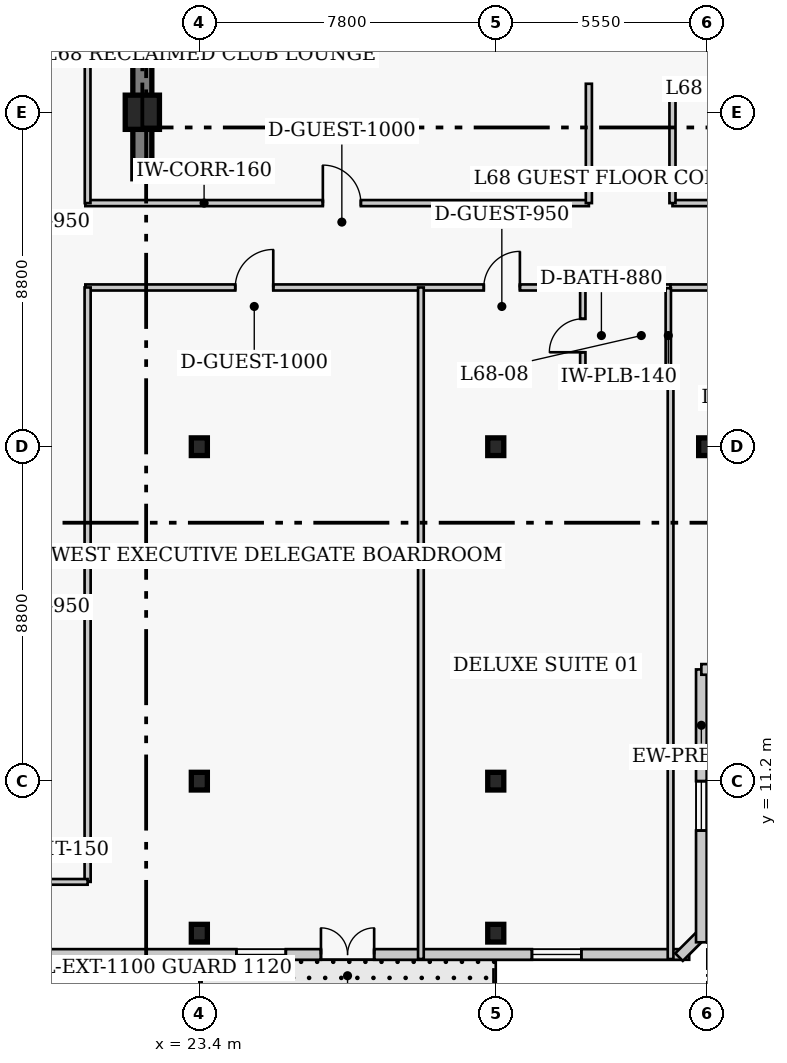
"""IFC4 building model, lengths in metres.
Left out: names, types, materials, properties, quantities, classifications, styles, units other than length and angle.
Written with IfcOpenShell. Run it as: python <this file> out.ifc"""

import sys

from ifc_helpers import new_model, si_unit, direction, frame, frame_2d, origin, origin_2d, place, context, subcontext, project, spatial, rectangle, i_section, extrude, element, fill, save


model = new_model("IFC4")
c1 = context("Model", 3, precision=1e-05, world=origin(), true_north=direction((0.0, 1.0)))
c2 = subcontext(c1, "Body", "Model", "MODEL_VIEW")
j1 = project(units=[si_unit("LENGTHUNIT", "METRE"), si_unit("PLANEANGLEUNIT", "RADIAN")], contexts=[c1])
p1 = place(None, origin())
s1 = spatial("IfcSite", under=j1, at=p1, CompositionType="ELEMENT")
p2 = place(p1, origin())
s2 = spatial("IfcBuilding", under=s1, at=p2, CompositionType="ELEMENT")
p3 = place(p2, frame((0.0, 0.0, 273.4)))
s3 = spatial("IfcBuildingStorey", under=s2, at=p3, CompositionType="ELEMENT", Elevation=273.4)
p4 = place(p3, frame((21.9, 27.05, 0.0), z_axis=(0.0, 0.0, 1.0), x_axis=(0.0, 1.0, 0.0)))
e1 = element("IfcWall", 1, at=p4, inside=s3, PredefinedType="SHEAR", context=c2, shape_type="SweptSolid", body=[
    extrude(rectangle(XDim=13.52, YDim=0.5, at=frame_2d((6.76, 0.0))), origin(), (0.0, 0.0, 1.0), 4.0),
])
for number, where, z_axis, x_axis in (
    (2, (23.4, 11.2, 0.0), (0.0, 0.0, 1.0), (1.0, 0.0, 0.0)),
    (3, (23.4, 20.0, 0.0), (0.0, 0.0, 1.0), (1.0, 0.0, 0.0)),
    (4, (31.2, 11.2, 0.0), (0.0, 0.0, 1.0), (1.0, 0.0, 0.0)),
    (5, (31.2, 20.0, 0.0), (0.0, 0.0, 1.0), (1.0, 0.0, 0.0)),
    (6, (36.75, 20.0, 0.0), (0.0, 0.0, 1.0), (1.0, 0.0, 0.0)),
):
    element("IfcColumn", number, at=place(p3, frame(where, z_axis=z_axis, x_axis=x_axis)), inside=s3, PredefinedType="COLUMN", context=c2, shape_type="SweptSolid", body=[
        extrude(i_section(OverallWidth=0.422, OverallDepth=0.465, WebThickness=0.045, FlangeThickness=0.073, FilletRadius=0.017, at=origin_2d()), origin(), (0.0, 0.0, 1.0), 4.0),
    ])
p5 = place(p3, frame((21.9, 28.8, 0.0), z_axis=(0.0, 0.0, 1.0), x_axis=(1.0, 0.0, 0.0)))
e7 = element("IfcColumn", 7, at=p5, inside=s3, PredefinedType="COLUMN", context=c2, shape_type="SweptSolid", body=[
    extrude(rectangle(XDim=0.9, YDim=0.9, at=origin_2d()), origin(), (0.0, 0.0, 1.0), 4.0),
])
for number, where, z_axis, x_axis in (
    (8, (23.4, 7.2, 0.0), (0.0, 0.0, 1.0), (1.0, 0.0, 0.0)),
    (9, (31.2, 7.2, 0.0), (0.0, 0.0, 1.0), (1.0, 0.0, 0.0)),
):
    element("IfcColumn", number, at=place(p3, frame(where, z_axis=z_axis, x_axis=x_axis)), inside=s3, PredefinedType="COLUMN", context=c2, shape_type="SweptSolid", body=[
        extrude(i_section(OverallWidth=0.422, OverallDepth=0.465, WebThickness=0.045, FlangeThickness=0.073, FilletRadius=0.017, at=origin_2d()), origin(), (0.0, 0.0, 1.0), 4.0),
    ])
p6 = place(p3, frame((11.46, 6.64, 0.0), z_axis=(0.0, 0.0, 1.0), x_axis=(1.0, 0.0, 0.0)))
e10 = element("IfcWall", 10, at=p6, inside=s3, PredefinedType="SOLIDWALL", context=c2, shape_type="SweptSolid", body=[
    extrude(rectangle(XDim=24.83, YDim=0.28, at=frame_2d((12.415, 0.0))), origin(), (0.0, 0.0, 1.0), 3.76),
])
p7 = place(p6, frame((15.14, 0.0, 0.0)))
e11 = element("IfcOpeningElement", 11, at=p7, cuts=e10, PredefinedType="OPENING", context=c2, shape_type="SweptSolid", body=[
    extrude(rectangle(XDim=1.4, YDim=2.15, at=frame_2d((0.7, 1.075))), frame((0.0, 0.15, 0.0), z_axis=(0.0, -1.0, 0.0), x_axis=(1.0, 0.0, 0.0)), (0.0, 0.0, 1.0), 0.3),
])
p8 = place(p6, frame((3.488, 0.0, 0.85)))
e12 = element("IfcOpeningElement", 12, at=p8, cuts=e10, PredefinedType="OPENING", context=c2, shape_type="SweptSolid", body=[
    extrude(rectangle(XDim=1.3, YDim=1.7, at=frame_2d((0.65, 0.85))), frame((0.0, 0.15, 0.0), z_axis=(0.0, -1.0, 0.0), x_axis=(1.0, 0.0, 0.0)), (0.0, 0.0, 1.0), 0.3),
])
p9 = place(p6, frame((12.915, 0.0, 0.85)))
e13 = element("IfcOpeningElement", 13, at=p9, cuts=e10, PredefinedType="OPENING", context=c2, shape_type="SweptSolid", body=[
    extrude(rectangle(XDim=1.3, YDim=1.7, at=frame_2d((0.65, 0.85))), frame((0.0, 0.15, 0.0), z_axis=(0.0, -1.0, 0.0), x_axis=(1.0, 0.0, 0.0)), (0.0, 0.0, 1.0), 0.3),
])
p10 = place(p6, frame((20.692, 0.0, 0.85)))
e14 = element("IfcOpeningElement", 14, at=p10, cuts=e10, PredefinedType="OPENING", context=c2, shape_type="SweptSolid", body=[
    extrude(rectangle(XDim=1.3, YDim=1.7, at=frame_2d((0.65, 0.85))), frame((0.0, 0.15, 0.0), z_axis=(0.0, -1.0, 0.0), x_axis=(1.0, 0.0, 0.0)), (0.0, 0.0, 1.0), 0.3),
])
p11 = place(p3, frame((36.023, 6.571, 0.0), z_axis=(0.0, 0.0, 1.0), x_axis=(0.707106781187, 0.707106781187, 0.0)))
e15 = element("IfcWall", 15, at=p11, inside=s3, PredefinedType="SOLIDWALL", context=c2, shape_type="SweptSolid", body=[
    extrude(rectangle(XDim=0.928, YDim=0.28, at=frame_2d((0.464, 0.0))), origin(), (0.0, 0.0, 1.0), 3.76),
])
p12 = place(p3, frame((36.61, 6.96, 0.0), z_axis=(0.0, 0.0, 1.0), x_axis=(0.0, 1.0, 0.0)))
e16 = element("IfcWall", 16, at=p12, inside=s3, PredefinedType="SOLIDWALL", context=c2, shape_type="SweptSolid", body=[
    extrude(rectangle(XDim=7.18, YDim=0.28, at=frame_2d((3.59, 0.0))), origin(), (0.0, 0.0, 1.0), 3.76),
])
p13 = place(p12, frame((2.94, 0.0, 0.85)))
e17 = element("IfcOpeningElement", 17, at=p13, cuts=e16, PredefinedType="OPENING", context=c2, shape_type="SweptSolid", body=[
    extrude(rectangle(XDim=1.3, YDim=1.7, at=frame_2d((0.65, 0.85))), frame((0.0, 0.15, 0.0), z_axis=(0.0, -1.0, 0.0), x_axis=(1.0, 0.0, 0.0)), (0.0, 0.0, 1.0), 0.3),
])
p14 = place(p3, frame((36.61, 14.14, 0.0), z_axis=(0.0, 0.0, 1.0), x_axis=(1.0, 0.0, 0.0)))
e18 = element("IfcWall", 18, at=p14, inside=s3, PredefinedType="SOLIDWALL", context=c2, shape_type="SweptSolid", body=[
    extrude(rectangle(XDim=4.78, YDim=0.28, at=frame_2d((2.39, 0.0))), origin(), (0.0, 0.0, 1.0), 3.76),
])
p15 = place(p14, frame((1.74, 0.0, 0.85)))
e19 = element("IfcOpeningElement", 19, at=p15, cuts=e18, PredefinedType="OPENING", context=c2, shape_type="SweptSolid", body=[
    extrude(rectangle(XDim=1.3, YDim=1.7, at=frame_2d((0.65, 0.85))), frame((0.0, 0.15, 0.0), z_axis=(0.0, -1.0, 0.0), x_axis=(1.0, 0.0, 0.0)), (0.0, 0.0, 1.0), 0.3),
])
p16 = place(p3, frame((20.4, 26.41, 0.0), z_axis=(0.0, 0.0, 1.0), x_axis=(1.0, 0.0, 0.0)))
e20 = element("IfcWall", 20, at=p16, inside=s3, PredefinedType="PARTITIONING", context=c2, shape_type="SweptSolid", body=[
    extrude(rectangle(XDim=13.25, YDim=0.16, at=frame_2d((6.625, 0.0))), origin(), (0.0, 0.0, 1.0), 3.76),
])
p17 = place(p16, frame((6.25, 0.0, 0.0)))
e21 = element("IfcOpeningElement", 21, at=p17, cuts=e20, PredefinedType="OPENING", context=c2, shape_type="SweptSolid", body=[
    extrude(rectangle(XDim=1.0, YDim=2.15, at=frame_2d((0.5, 1.075))), frame((0.0, 0.09, 0.0), z_axis=(0.0, -1.0, 0.0), x_axis=(1.0, 0.0, 0.0)), (0.0, 0.0, 1.0), 0.18),
])
p18 = place(p3, frame((35.85, 26.41, 0.0), z_axis=(0.0, 0.0, 1.0), x_axis=(1.0, 0.0, 0.0)))
e22 = element("IfcWall", 22, at=p18, inside=s3, PredefinedType="PARTITIONING", context=c2, shape_type="SweptSolid", body=[
    extrude(rectangle(XDim=22.6, YDim=0.16, at=frame_2d((11.3, 0.0))), origin(), (0.0, 0.0, 1.0), 3.76),
])
p19 = place(p18, frame((4.55, 0.0, 0.0)))
e23 = element("IfcOpeningElement", 23, at=p19, cuts=e22, PredefinedType="OPENING", context=c2, shape_type="SweptSolid", body=[
    extrude(rectangle(XDim=1.0, YDim=2.15, at=frame_2d((0.5, 1.075))), frame((0.0, 0.09, 0.0), z_axis=(0.0, -1.0, 0.0), x_axis=(1.0, 0.0, 0.0)), (0.0, 0.0, 1.0), 0.18),
])
p20 = place(p18, frame((12.05, 0.0, 0.0)))
e24 = element("IfcOpeningElement", 24, at=p20, cuts=e22, PredefinedType="OPENING", context=c2, shape_type="SweptSolid", body=[
    extrude(rectangle(XDim=1.0, YDim=2.15, at=frame_2d((0.5, 1.075))), frame((0.0, 0.09, 0.0), z_axis=(0.0, -1.0, 0.0), x_axis=(1.0, 0.0, 0.0)), (0.0, 0.0, 1.0), 0.18),
])
for number, where, z_axis, x_axis in (
    (25, (33.65, 26.41, 0.0), (0.0, 0.0, 1.0), (0.0, 1.0, 0.0)),
    (26, (35.85, 26.41, 0.0), (0.0, 0.0, 1.0), (0.0, 1.0, 0.0)),
):
    element("IfcWall", number, at=place(p3, frame(where, z_axis=z_axis, x_axis=x_axis)), inside=s3, PredefinedType="PARTITIONING", context=c2, shape_type="SweptSolid", body=[
        extrude(rectangle(XDim=3.14, YDim=0.16, at=frame_2d((1.57, 0.0))), origin(), (0.0, 0.0, 1.0), 3.76),
    ])
p21 = place(p3, frame((20.4, 24.19, 0.0), z_axis=(0.0, 0.0, 1.0), x_axis=(1.0, 0.0, 0.0)))
e27 = element("IfcWall", 27, at=p21, inside=s3, PredefinedType="PARTITIONING", context=c2, shape_type="SweptSolid", body=[
    extrude(rectangle(XDim=15.4, YDim=0.16, at=frame_2d((7.7, 0.0))), origin(), (0.0, 0.0, 1.0), 3.76),
])
p22 = place(p21, frame((3.945, 0.0, 0.0)))
e28 = element("IfcOpeningElement", 28, at=p22, cuts=e27, PredefinedType="OPENING", context=c2, shape_type="SweptSolid", body=[
    extrude(rectangle(XDim=1.0, YDim=2.15, at=frame_2d((0.5, 1.075))), frame((0.0, 0.09, 0.0), z_axis=(0.0, -1.0, 0.0), x_axis=(1.0, 0.0, 0.0)), (0.0, 0.0, 1.0), 0.18),
])
p23 = place(p21, frame((10.485, 0.0, 0.0)))
e29 = element("IfcOpeningElement", 29, at=p23, cuts=e27, PredefinedType="OPENING", context=c2, shape_type="SweptSolid", body=[
    extrude(rectangle(XDim=0.95, YDim=2.1, at=frame_2d((0.475, 1.05))), frame((0.0, 0.09, 0.0), z_axis=(0.0, -1.0, 0.0), x_axis=(1.0, 0.0, 0.0)), (0.0, 0.0, 1.0), 0.18),
])
p24 = place(p3, frame((35.8, 24.19, 0.0), z_axis=(0.0, 0.0, 1.0), x_axis=(1.0, 0.0, 0.0)))
e30 = element("IfcWall", 30, at=p24, inside=s3, PredefinedType="PARTITIONING", context=c2, shape_type="SweptSolid", body=[
    extrude(rectangle(XDim=24.81, YDim=0.16, at=frame_2d((12.405, 0.0))), origin(), (0.0, 0.0, 1.0), 3.76),
])
p25 = place(p24, frame((2.115, 0.0, 0.0)))
e31 = element("IfcOpeningElement", 31, at=p25, cuts=e30, PredefinedType="OPENING", context=c2, shape_type="SweptSolid", body=[
    extrude(rectangle(XDim=0.95, YDim=2.1, at=frame_2d((0.475, 1.05))), frame((0.0, 0.09, 0.0), z_axis=(0.0, -1.0, 0.0), x_axis=(1.0, 0.0, 0.0)), (0.0, 0.0, 1.0), 0.18),
])
p26 = place(p24, frame((11.345, 0.0, 0.0)))
e32 = element("IfcOpeningElement", 32, at=p26, cuts=e30, PredefinedType="OPENING", context=c2, shape_type="SweptSolid", body=[
    extrude(rectangle(XDim=1.0, YDim=2.15, at=frame_2d((0.5, 1.075))), frame((0.0, 0.09, 0.0), z_axis=(0.0, -1.0, 0.0), x_axis=(1.0, 0.0, 0.0)), (0.0, 0.0, 1.0), 0.18),
])
p27 = place(p24, frame((17.47, 0.0, 0.0)))
e33 = element("IfcOpeningElement", 33, at=p27, cuts=e30, PredefinedType="OPENING", context=c2, shape_type="SweptSolid", body=[
    extrude(rectangle(XDim=0.95, YDim=2.1, at=frame_2d((0.475, 1.05))), frame((0.0, 0.09, 0.0), z_axis=(0.0, -1.0, 0.0), x_axis=(1.0, 0.0, 0.0)), (0.0, 0.0, 1.0), 0.18),
])
p28 = place(p24, frame((23.265, 0.0, 0.0)))
e34 = element("IfcOpeningElement", 34, at=p28, cuts=e30, PredefinedType="OPENING", context=c2, shape_type="SweptSolid", body=[
    extrude(rectangle(XDim=0.95, YDim=2.1, at=frame_2d((0.475, 1.05))), frame((0.0, 0.09, 0.0), z_axis=(0.0, -1.0, 0.0), x_axis=(1.0, 0.0, 0.0)), (0.0, 0.0, 1.0), 0.18),
])
p29 = place(p3, frame((20.46, 8.55, 0.0), z_axis=(0.0, 0.0, 1.0), x_axis=(0.0, 1.0, 0.0)))
e35 = element("IfcWall", 35, at=p29, inside=s3, PredefinedType="PARTITIONING", context=c2, shape_type="SweptSolid", body=[
    extrude(rectangle(XDim=15.64, YDim=0.16, at=frame_2d((7.82, 0.0))), origin(), (0.0, 0.0, 1.0), 3.76),
])
p30 = place(p3, frame((18.24, 8.55, 0.0), z_axis=(0.0, 0.0, 1.0), x_axis=(1.0, 0.0, 0.0)))
e36 = element("IfcWall", 36, at=p30, inside=s3, PredefinedType="PARTITIONING", context=c2, shape_type="SweptSolid", body=[
    extrude(rectangle(XDim=2.22, YDim=0.15, at=frame_2d((1.11, 0.0))), origin(), (0.0, 0.0, 1.0), 3.76),
])
p31 = place(p3, frame((20.46, 26.41, 0.0), z_axis=(0.0, 0.0, 1.0), x_axis=(0.0, 1.0, 0.0)))
e37 = element("IfcWall", 37, at=p31, inside=s3, PredefinedType="PARTITIONING", context=c2, shape_type="SweptSolid", body=[
    extrude(rectangle(XDim=6.39, YDim=0.15, at=frame_2d((3.195, 0.0))), origin(), (0.0, 0.0, 1.0), 3.76),
])
p32 = place(p3, frame((29.23, 6.52, 0.0), z_axis=(0.0, 0.0, 1.0), x_axis=(0.0, 1.0, 0.0)))
e38 = element("IfcWall", 38, at=p32, inside=s3, PredefinedType="PARTITIONING", context=c2, shape_type="SweptSolid", body=[
    extrude(rectangle(XDim=17.67, YDim=0.15, at=frame_2d((8.835, 0.0))), origin(), (0.0, 0.0, 1.0), 3.76),
])
p33 = place(p3, frame((33.49, 21.68, 0.0), z_axis=(0.0, 0.0, 1.0), x_axis=(0.0, 1.0, 0.0)))
e39 = element("IfcWall", 39, at=p33, inside=s3, PredefinedType="PLUMBINGWALL", context=c2, shape_type="SweptSolid", body=[
    extrude(rectangle(XDim=2.49, YDim=0.14, at=frame_2d((1.245, 0.0))), origin(), (0.0, 0.0, 1.0), 3.76),
])
p34 = place(p33, frame((0.805, 0.0, 0.0)))
e40 = element("IfcOpeningElement", 40, at=p34, cuts=e39, PredefinedType="OPENING", context=c2, shape_type="SweptSolid", body=[
    extrude(rectangle(XDim=0.88, YDim=2.05, at=frame_2d((0.44, 1.025))), frame((0.0, 0.08, 0.0), z_axis=(0.0, -1.0, 0.0), x_axis=(1.0, 0.0, 0.0)), (0.0, 0.0, 1.0), 0.16),
])
p35 = place(p3, frame((35.74, 21.68, 0.0), z_axis=(0.0, 0.0, 1.0), x_axis=(0.0, 1.0, 0.0)))
e41 = element("IfcWall", 41, at=p35, inside=s3, PredefinedType="PLUMBINGWALL", context=c2, shape_type="SweptSolid", body=[
    extrude(rectangle(XDim=2.49, YDim=0.14, at=frame_2d((1.245, 0.0))), origin(), (0.0, 0.0, 1.0), 3.76),
])
p36 = place(p3, frame((33.49, 21.68, 0.0), z_axis=(0.0, 0.0, 1.0), x_axis=(1.0, 0.0, 0.0)))
e42 = element("IfcWall", 42, at=p36, inside=s3, PredefinedType="PLUMBINGWALL", context=c2, shape_type="SweptSolid", body=[
    extrude(rectangle(XDim=2.25, YDim=0.14, at=frame_2d((1.125, 0.0))), origin(), (0.0, 0.0, 1.0), 3.76),
])
p37 = place(p3, frame((35.8, 6.52, 0.0), z_axis=(0.0, 0.0, 1.0), x_axis=(0.0, 1.0, 0.0)))
e43 = element("IfcWall", 43, at=p37, inside=s3, PredefinedType="PARTITIONING", context=c2, shape_type="SweptSolid", body=[
    extrude(rectangle(XDim=15.16, YDim=0.15, at=frame_2d((7.58, 0.0))), origin(), (0.0, 0.0, 1.0), 3.76),
])
p38 = place(p7, origin())
e44 = element("IfcDoor", 44, at=p38, inside=s3, OperationType="DOUBLE_DOOR_SINGLE_SWING", PredefinedType="DOOR", context=c2, shape_type="SweptSolid", body=[
    extrude(rectangle(XDim=1.4, YDim=2.15, at=frame_2d((0.7, 1.075))), frame((0.0, 0.025, 0.0), z_axis=(0.0, -1.0, 0.0), x_axis=(1.0, 0.0, 0.0)), (0.0, 0.0, 1.0), 0.05),
])
fill(e11, e44)
p39 = place(p9, origin())
e45 = element("IfcWindow", 45, at=p39, inside=s3, PartitioningType="SINGLE_PANEL", PredefinedType="WINDOW", context=c2, shape_type="SweptSolid", body=[
    extrude(rectangle(XDim=1.3, YDim=1.7, at=frame_2d((0.65, 0.85))), frame((0.0, 0.03, 0.0), z_axis=(0.0, -1.0, 0.0), x_axis=(1.0, 0.0, 0.0)), (0.0, 0.0, 1.0), 0.06),
])
fill(e13, e45)
p40 = place(p10, origin())
e46 = element("IfcWindow", 46, at=p40, inside=s3, PartitioningType="SINGLE_PANEL", PredefinedType="WINDOW", context=c2, shape_type="SweptSolid", body=[
    extrude(rectangle(XDim=1.3, YDim=1.7, at=frame_2d((0.65, 0.85))), frame((0.0, 0.03, 0.0), z_axis=(0.0, -1.0, 0.0), x_axis=(1.0, 0.0, 0.0)), (0.0, 0.0, 1.0), 0.06),
])
fill(e14, e46)
p41 = place(p13, origin())
e47 = element("IfcWindow", 47, at=p41, inside=s3, PartitioningType="SINGLE_PANEL", PredefinedType="WINDOW", context=c2, shape_type="SweptSolid", body=[
    extrude(rectangle(XDim=1.3, YDim=1.7, at=frame_2d((0.65, 0.85))), frame((0.0, 0.03, 0.0), z_axis=(0.0, -1.0, 0.0), x_axis=(1.0, 0.0, 0.0)), (0.0, 0.0, 1.0), 0.06),
])
fill(e17, e47)
p42 = place(p17, origin())
e48 = element("IfcDoor", 48, at=p42, inside=s3, OperationType="SINGLE_SWING_LEFT", PredefinedType="DOOR", context=c2, shape_type="SweptSolid", body=[
    extrude(rectangle(XDim=1.0, YDim=2.15, at=frame_2d((0.5, 1.075))), frame((0.0, 0.025, 0.0), z_axis=(0.0, -1.0, 0.0), x_axis=(1.0, 0.0, 0.0)), (0.0, 0.0, 1.0), 0.05),
])
fill(e21, e48)
p43 = place(p22, origin())
e49 = element("IfcDoor", 49, at=p43, inside=s3, OperationType="SINGLE_SWING_RIGHT", PredefinedType="DOOR", context=c2, shape_type="SweptSolid", body=[
    extrude(rectangle(XDim=1.0, YDim=2.15, at=frame_2d((0.5, 1.075))), frame((0.0, 0.025, 0.0), z_axis=(0.0, -1.0, 0.0), x_axis=(1.0, 0.0, 0.0)), (0.0, 0.0, 1.0), 0.05),
])
fill(e28, e49)
p44 = place(p34, origin())
e50 = element("IfcDoor", 50, at=p44, inside=s3, OperationType="SINGLE_SWING_LEFT", PredefinedType="DOOR", context=c2, shape_type="SweptSolid", body=[
    extrude(rectangle(XDim=0.88, YDim=2.05, at=frame_2d((0.44, 1.025))), frame((0.0, 0.025, 0.0), z_axis=(0.0, -1.0, 0.0), x_axis=(1.0, 0.0, 0.0)), (0.0, 0.0, 1.0), 0.05),
])
fill(e40, e50)
p45 = place(p23, origin())
e51 = element("IfcDoor", 51, at=p45, inside=s3, OperationType="SINGLE_SWING_RIGHT", PredefinedType="DOOR", context=c2, shape_type="SweptSolid", body=[
    extrude(rectangle(XDim=0.95, YDim=2.1, at=frame_2d((0.475, 1.05))), frame((0.0, 0.025, 0.0), z_axis=(0.0, -1.0, 0.0), x_axis=(1.0, 0.0, 0.0)), (0.0, 0.0, 1.0), 0.05),
])
fill(e29, e51)
save(model, sys.argv[1])
